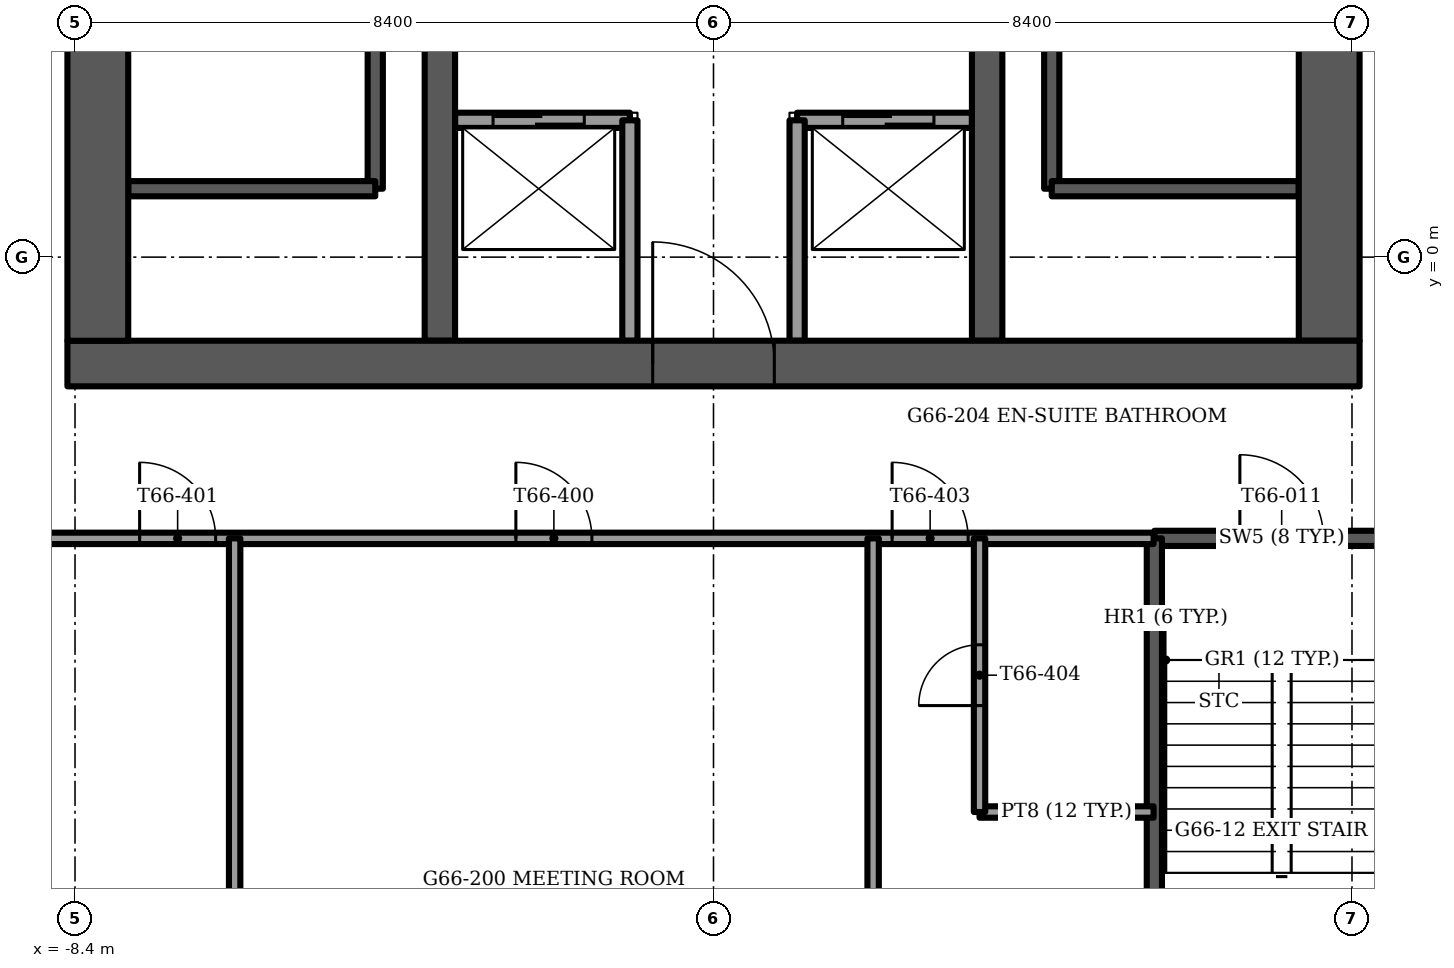
"""IFC4 building model, lengths in metres.
Left out: names, types, materials, properties, quantities, classifications, styles, units other than length and angle.
Written with IfcOpenShell. Run it as: python <this file> out.ifc"""

import sys

from ifc_helpers import new_model, si_unit, direction, frame, frame_2d, origin, place, context, subcontext, project, spatial, rectangle, extrude, element, fill, save


model = new_model("IFC4")
c1 = context("Model", 3, precision=1e-05, world=origin(), true_north=direction((0.0, 1.0)))
c2 = subcontext(c1, "Body", "Model", "MODEL_VIEW")
j1 = project(units=[si_unit("LENGTHUNIT", "METRE"), si_unit("PLANEANGLEUNIT", "RADIAN")], contexts=[c1])
p1 = place(None, origin())
s1 = spatial("IfcSite", under=j1, at=p1, CompositionType="ELEMENT")
p2 = place(p1, origin())
s2 = spatial("IfcBuilding", under=s1, at=p2, CompositionType="ELEMENT")
p3 = place(p2, frame((0.0, 0.0, 267.5)))
s3 = spatial("IfcBuildingStorey", under=s2, at=p3, CompositionType="ELEMENT", Elevation=267.5)
p4 = place(p3, frame((-8.5, -1.4, -0.3), z_axis=(0.0, 0.0, 1.0), x_axis=(1.0, 0.0, 0.0)))
e1 = element("IfcWall", 1, at=p4, inside=s3, PredefinedType="SHEAR", context=c2, shape_type="SweptSolid", body=[
    extrude(rectangle(XDim=17.0, YDim=0.6, at=frame_2d((8.5, 0.0))), origin(), (0.0, 0.0, 1.0), 3.75),
])
p5 = place(p4, frame((7.7, 0.0, 0.0)))
e2 = element("IfcOpeningElement", 2, at=p5, cuts=e1, PredefinedType="OPENING", context=c2, shape_type="SweptSolid", body=[
    extrude(rectangle(XDim=1.6, YDim=2.1, at=frame_2d((0.8, 1.05))), frame((0.0, 0.3, 0.0), z_axis=(0.0, -1.0, 0.0), x_axis=(1.0, 0.0, 0.0)), (0.0, 0.0, 1.0), 0.6),
])
p6 = place(p3, frame((-8.1, -1.1, -0.3), z_axis=(0.0, 0.0, 1.0), x_axis=(0.0, 1.0, 0.0)))
e3 = element("IfcWall", 3, at=p6, inside=s3, PredefinedType="SHEAR", context=c2, shape_type="SweptSolid", body=[
    extrude(rectangle(XDim=10.2, YDim=0.8, at=frame_2d((5.1, 0.0))), origin(), (0.0, 0.0, 1.0), 3.75),
])
p7 = place(p6, frame((8.35, 0.0, 0.0)))
e4 = element("IfcOpeningElement", 4, at=p7, cuts=e3, PredefinedType="OPENING", context=c2, shape_type="SweptSolid", body=[
    extrude(rectangle(XDim=1.1, YDim=2.1, at=frame_2d((0.55, 1.05))), frame((0.0, 0.4, 0.0), z_axis=(0.0, -1.0, 0.0), x_axis=(1.0, 0.0, 0.0)), (0.0, 0.0, 1.0), 0.8),
])
p8 = place(p3, frame((8.1, -1.1, -0.3), z_axis=(0.0, 0.0, 1.0), x_axis=(0.0, 1.0, 0.0)))
e5 = element("IfcWall", 5, at=p8, inside=s3, PredefinedType="SHEAR", context=c2, shape_type="SweptSolid", body=[
    extrude(rectangle(XDim=10.2, YDim=0.8, at=frame_2d((5.1, 0.0))), origin(), (0.0, 0.0, 1.0), 3.75),
])
p9 = place(p8, frame((8.35, 0.0, 0.0)))
e6 = element("IfcOpeningElement", 6, at=p9, cuts=e5, PredefinedType="OPENING", context=c2, shape_type="SweptSolid", body=[
    extrude(rectangle(XDim=1.1, YDim=2.1, at=frame_2d((0.55, 1.05))), frame((0.0, 0.4, 0.0), z_axis=(0.0, -1.0, 0.0), x_axis=(1.0, 0.0, 0.0)), (0.0, 0.0, 1.0), 0.8),
])
for number, where, z_axis, x_axis in (
    (7, (-3.6, -1.1, -0.3), (0.0, 0.0, 1.0), (0.0, 1.0, 0.0)),
    (8, (3.6, -1.1, -0.3), (0.0, 0.0, 1.0), (0.0, 1.0, 0.0)),
):
    element("IfcWall", number, at=place(p3, frame(where, z_axis=z_axis, x_axis=x_axis)), inside=s3, PredefinedType="SHEAR", context=c2, shape_type="SweptSolid", body=[
        extrude(rectangle(XDim=10.2, YDim=0.4, at=frame_2d((5.1, 0.0))), origin(), (0.0, 0.0, 1.0), 3.75),
    ])
p10 = place(p3, frame((-5.626, 15.792, 0.0), z_axis=(0.0, 0.0, 1.0), x_axis=(-0.499998195608, -0.866026445548, 0.0)))
e9 = element("IfcWall", 9, at=p10, inside=s3, PredefinedType="SOLIDWALL", context=c2, shape_type="SweptSolid", body=[
    extrude(rectangle(XDim=18.956, YDim=0.15, at=frame_2d((9.478, 0.0))), origin(), (0.0, 0.0, 1.0), 3.45),
])
p11 = place(p10, frame((3.577, 0.0, 0.0)))
e10 = element("IfcOpeningElement", 10, at=p11, cuts=e9, PredefinedType="OPENING", context=c2, shape_type="SweptSolid", body=[
    extrude(rectangle(XDim=1.4, YDim=2.4, at=frame_2d((0.7, 1.2))), frame((0.0, 0.075, 0.0), z_axis=(0.0, -1.0, 0.0), x_axis=(1.0, 0.0, 0.0)), (0.0, 0.0, 1.0), 0.15),
])
p12 = place(p10, frame((9.62, 0.0, 0.15)))
e11 = element("IfcOpeningElement", 11, at=p12, cuts=e9, PredefinedType="OPENING", context=c2, shape_type="SweptSolid", body=[
    extrude(rectangle(XDim=0.9, YDim=2.85, at=frame_2d((0.45, 1.425))), frame((0.0, 0.075, 0.0), z_axis=(0.0, -1.0, 0.0), x_axis=(1.0, 0.0, 0.0)), (0.0, 0.0, 1.0), 0.15),
])
p13 = place(p10, frame((7.52, 0.0, 0.15)))
e12 = element("IfcOpeningElement", 12, at=p13, cuts=e9, PredefinedType="OPENING", context=c2, shape_type="SweptSolid", body=[
    extrude(rectangle(XDim=1.4, YDim=2.85, at=frame_2d((0.7, 1.425))), frame((0.0, 0.075, 0.0), z_axis=(0.0, -1.0, 0.0), x_axis=(1.0, 0.0, 0.0)), (0.0, 0.0, 1.0), 0.15),
])
p14 = place(p10, frame((11.164, 0.0, 0.15)))
e13 = element("IfcOpeningElement", 13, at=p14, cuts=e9, PredefinedType="OPENING", context=c2, shape_type="SweptSolid", body=[
    extrude(rectangle(XDim=1.5, YDim=2.85, at=frame_2d((0.75, 1.425))), frame((0.0, 0.075, 0.0), z_axis=(0.0, -1.0, 0.0), x_axis=(1.0, 0.0, 0.0)), (0.0, 0.0, 1.0), 0.15),
])
p15 = place(p10, frame((13.364, 0.0, 0.15)))
e14 = element("IfcOpeningElement", 14, at=p15, cuts=e9, PredefinedType="OPENING", context=c2, shape_type="SweptSolid", body=[
    extrude(rectangle(XDim=1.4, YDim=2.85, at=frame_2d((0.7, 1.425))), frame((0.0, 0.075, 0.0), z_axis=(0.0, -1.0, 0.0), x_axis=(1.0, 0.0, 0.0)), (0.0, 0.0, 1.0), 0.15),
])
p16 = place(p10, frame((0.394, 0.0, 0.15)))
e15 = element("IfcOpeningElement", 15, at=p16, cuts=e9, PredefinedType="OPENING", context=c2, shape_type="SweptSolid", body=[
    extrude(rectangle(XDim=1.5, YDim=2.73, at=frame_2d((0.75, 1.365))), frame((0.0, 0.075, 0.0), z_axis=(0.0, -1.0, 0.0), x_axis=(1.0, 0.0, 0.0)), (0.0, 0.0, 1.0), 0.15),
])
p17 = place(p10, frame((15.574, 0.0, 0.15)))
e16 = element("IfcOpeningElement", 16, at=p17, cuts=e9, PredefinedType="OPENING", context=c2, shape_type="SweptSolid", body=[
    extrude(rectangle(XDim=1.5, YDim=2.73, at=frame_2d((0.75, 1.365))), frame((0.0, 0.075, 0.0), z_axis=(0.0, -1.0, 0.0), x_axis=(1.0, 0.0, 0.0)), (0.0, 0.0, 1.0), 0.15),
])
p18 = place(p3, frame((15.104, -0.624, 0.0), z_axis=(0.0, 0.0, 1.0), x_axis=(-0.499998195608, 0.866026445548, 0.0)))
e17 = element("IfcWall", 17, at=p18, inside=s3, PredefinedType="SOLIDWALL", context=c2, shape_type="SweptSolid", body=[
    extrude(rectangle(XDim=18.956, YDim=0.15, at=frame_2d((9.478, 0.0))), origin(), (0.0, 0.0, 1.0), 3.45),
])
p19 = place(p18, frame((4.192, 0.0, 0.15)))
e18 = element("IfcOpeningElement", 18, at=p19, cuts=e17, PredefinedType="OPENING", context=c2, shape_type="SweptSolid", body=[
    extrude(rectangle(XDim=1.5, YDim=2.85, at=frame_2d((0.75, 1.425))), frame((0.0, 0.075, 0.0), z_axis=(0.0, -1.0, 0.0), x_axis=(1.0, 0.0, 0.0)), (0.0, 0.0, 1.0), 0.15),
])
p20 = place(p18, frame((6.392, 0.0, 0.15)))
e19 = element("IfcOpeningElement", 19, at=p20, cuts=e17, PredefinedType="OPENING", context=c2, shape_type="SweptSolid", body=[
    extrude(rectangle(XDim=1.4, YDim=2.85, at=frame_2d((0.7, 1.425))), frame((0.0, 0.075, 0.0), z_axis=(0.0, -1.0, 0.0), x_axis=(1.0, 0.0, 0.0)), (0.0, 0.0, 1.0), 0.15),
])
p21 = place(p18, frame((8.392, 0.0, 0.15)))
e20 = element("IfcOpeningElement", 20, at=p21, cuts=e17, PredefinedType="OPENING", context=c2, shape_type="SweptSolid", body=[
    extrude(rectangle(XDim=0.9, YDim=2.85, at=frame_2d((0.45, 1.425))), frame((0.0, 0.075, 0.0), z_axis=(0.0, -1.0, 0.0), x_axis=(1.0, 0.0, 0.0)), (0.0, 0.0, 1.0), 0.15),
])
p22 = place(p18, frame((10.592, 0.0, 0.15)))
e21 = element("IfcOpeningElement", 21, at=p22, cuts=e17, PredefinedType="OPENING", context=c2, shape_type="SweptSolid", body=[
    extrude(rectangle(XDim=1.4, YDim=2.85, at=frame_2d((0.7, 1.425))), frame((0.0, 0.075, 0.0), z_axis=(0.0, -1.0, 0.0), x_axis=(1.0, 0.0, 0.0)), (0.0, 0.0, 1.0), 0.15),
])
p23 = place(p18, frame((14.168, 0.0, 0.0)))
e22 = element("IfcOpeningElement", 22, at=p23, cuts=e17, PredefinedType="OPENING", context=c2, shape_type="SweptSolid", body=[
    extrude(rectangle(XDim=1.4, YDim=2.4, at=frame_2d((0.7, 1.2))), frame((0.0, 0.075, 0.0), z_axis=(0.0, -1.0, 0.0), x_axis=(1.0, 0.0, 0.0)), (0.0, 0.0, 1.0), 0.15),
])
p24 = place(p18, frame((0.998, 0.0, 0.15)))
e23 = element("IfcOpeningElement", 23, at=p24, cuts=e17, PredefinedType="OPENING", context=c2, shape_type="SweptSolid", body=[
    extrude(rectangle(XDim=1.5, YDim=2.73, at=frame_2d((0.75, 1.365))), frame((0.0, 0.075, 0.0), z_axis=(0.0, -1.0, 0.0), x_axis=(1.0, 0.0, 0.0)), (0.0, 0.0, 1.0), 0.15),
])
p25 = place(p18, frame((17.062, 0.0, 0.15)))
e24 = element("IfcOpeningElement", 24, at=p25, cuts=e17, PredefinedType="OPENING", context=c2, shape_type="SweptSolid", body=[
    extrude(rectangle(XDim=1.5, YDim=2.73, at=frame_2d((0.75, 1.365))), frame((0.0, 0.075, 0.0), z_axis=(0.0, -1.0, 0.0), x_axis=(1.0, 0.0, 0.0)), (0.0, 0.0, 1.0), 0.15),
])
p26 = place(p3, frame((-3.4, 1.8, 0.0), z_axis=(0.0, 0.0, 1.0), x_axis=(1.0, 0.0, 0.0)))
e25 = element("IfcWall", 25, at=p26, inside=s3, PredefinedType="PARTITIONING", context=c2, shape_type="SweptSolid", body=[
    extrude(rectangle(XDim=2.3, YDim=0.2, at=frame_2d((1.15, 0.0))), origin(), (0.0, 0.0, 1.0), 3.45),
])
p27 = place(p26, frame((0.5, 0.0, 0.0)))
e26 = element("IfcOpeningElement", 26, at=p27, cuts=e25, PredefinedType="OPENING", context=c2, shape_type="SweptSolid", body=[
    extrude(rectangle(XDim=1.2, YDim=2.1, at=frame_2d((0.6, 1.05))), frame((0.0, 0.1, 0.0), z_axis=(0.0, -1.0, 0.0), x_axis=(1.0, 0.0, 0.0)), (0.0, 0.0, 1.0), 0.2),
])
p28 = place(p3, frame((1.1, 1.8, 0.0), z_axis=(0.0, 0.0, 1.0), x_axis=(1.0, 0.0, 0.0)))
e27 = element("IfcWall", 27, at=p28, inside=s3, PredefinedType="PARTITIONING", context=c2, shape_type="SweptSolid", body=[
    extrude(rectangle(XDim=2.3, YDim=0.2, at=frame_2d((1.15, 0.0))), origin(), (0.0, 0.0, 1.0), 3.45),
])
p29 = place(p28, frame((0.6, 0.0, 0.0)))
e28 = element("IfcOpeningElement", 28, at=p29, cuts=e27, PredefinedType="OPENING", context=c2, shape_type="SweptSolid", body=[
    extrude(rectangle(XDim=1.2, YDim=2.1, at=frame_2d((0.6, 1.05))), frame((0.0, 0.1, 0.0), z_axis=(0.0, -1.0, 0.0), x_axis=(1.0, 0.0, 0.0)), (0.0, 0.0, 1.0), 0.2),
])
for number, where, z_axis, x_axis in (
    (29, (-1.1, -1.1, 0.0), (0.0, 0.0, 1.0), (0.0, 1.0, 0.0)),
    (30, (1.1, -1.1, 0.0), (0.0, 0.0, 1.0), (0.0, 1.0, 0.0)),
):
    element("IfcWall", number, at=place(p3, frame(where, z_axis=z_axis, x_axis=x_axis)), inside=s3, PredefinedType="PARTITIONING", context=c2, shape_type="SweptSolid", body=[
        extrude(rectangle(XDim=2.9, YDim=0.2, at=frame_2d((1.45, 0.0))), origin(), (0.0, 0.0, 1.0), 3.45),
    ])
p30 = place(p3, frame((-4.45, 0.9, -0.3), z_axis=(0.0, 0.0, 1.0), x_axis=(0.0, 1.0, 0.0)))
e31 = element("IfcWall", 31, at=p30, inside=s3, PredefinedType="SOLIDWALL", context=c2, shape_type="SweptSolid", body=[
    extrude(rectangle(XDim=8.2, YDim=0.2, at=frame_2d((4.1, 0.0))), origin(), (0.0, 0.0, 1.0), 3.75),
])
p31 = place(p3, frame((-7.7, 0.9, -0.3), z_axis=(0.0, 0.0, 1.0), x_axis=(1.0, 0.0, 0.0)))
e32 = element("IfcWall", 32, at=p31, inside=s3, PredefinedType="SOLIDWALL", context=c2, shape_type="SweptSolid", body=[
    extrude(rectangle(XDim=3.25, YDim=0.2, at=frame_2d((1.625, 0.0))), origin(), (0.0, 0.0, 1.0), 3.75),
])
p32 = place(p3, frame((4.45, 0.9, -0.3), z_axis=(0.0, 0.0, 1.0), x_axis=(0.0, 1.0, 0.0)))
e33 = element("IfcWall", 33, at=p32, inside=s3, PredefinedType="SOLIDWALL", context=c2, shape_type="SweptSolid", body=[
    extrude(rectangle(XDim=8.2, YDim=0.2, at=frame_2d((4.1, 0.0))), origin(), (0.0, 0.0, 1.0), 3.75),
])
p33 = place(p3, frame((4.45, 0.9, -0.3), z_axis=(0.0, 0.0, 1.0), x_axis=(1.0, 0.0, 0.0)))
e34 = element("IfcWall", 34, at=p33, inside=s3, PredefinedType="SOLIDWALL", context=c2, shape_type="SweptSolid", body=[
    extrude(rectangle(XDim=3.25, YDim=0.2, at=frame_2d((1.625, 0.0))), origin(), (0.0, 0.0, 1.0), 3.75),
])
p34 = place(p3, frame((5.8, -3.7, -0.3), z_axis=(0.0, 0.0, 1.0), x_axis=(1.0, 0.0, 0.0)))
e35 = element("IfcWall", 35, at=p34, inside=s3, PredefinedType="SOLIDWALL", context=c2, shape_type="SweptSolid", body=[
    extrude(rectangle(XDim=3.35, YDim=0.2, at=frame_2d((1.675, 0.0))), origin(), (0.0, 0.0, 1.0), 3.75),
])
p35 = place(p34, frame((1.125, 0.0, 0.0)))
e36 = element("IfcOpeningElement", 36, at=p35, cuts=e35, PredefinedType="OPENING", context=c2, shape_type="SweptSolid", body=[
    extrude(rectangle(XDim=1.1, YDim=2.1, at=frame_2d((0.55, 1.05))), frame((0.0, 0.1, 0.0), z_axis=(0.0, -1.0, 0.0), x_axis=(1.0, 0.0, 0.0)), (0.0, 0.0, 1.0), 0.2),
])
p36 = place(p3, frame((5.8, -3.7, -0.3), z_axis=(0.0, 0.0, 1.0), x_axis=(0.0, -1.0, 0.0)))
e37 = element("IfcWall", 37, at=p36, inside=s3, PredefinedType="SOLIDWALL", context=c2, shape_type="SweptSolid", body=[
    extrude(rectangle(XDim=7.7, YDim=0.2, at=frame_2d((3.85, 0.0))), origin(), (0.0, 0.0, 1.0), 3.75),
])
p37 = place(p3, frame((3.5, -7.3, 0.0), z_axis=(0.0, 0.0, 1.0), x_axis=(1.0, 0.0, 0.0)))
e38 = element("IfcWall", 38, at=p37, inside=s3, PredefinedType="PARTITIONING", context=c2, shape_type="SweptSolid", body=[
    extrude(rectangle(XDim=2.29, YDim=0.15, at=frame_2d((1.145, 0.0))), origin(), (0.0, 0.0, 1.0), 3.45),
])
p38 = place(p3, frame((-13.995, -3.7, 0.0), z_axis=(0.0, 0.0, 1.0), x_axis=(1.0, 0.0, 0.0)))
e39 = element("IfcWall", 39, at=p38, inside=s3, PredefinedType="PARTITIONING", context=c2, shape_type="SweptSolid", body=[
    extrude(rectangle(XDim=19.785, YDim=0.15, at=frame_2d((9.893, 0.0))), origin(), (0.0, 0.0, 1.0), 3.45),
])
p39 = place(p38, frame((11.395, 0.0, 0.0)))
e40 = element("IfcOpeningElement", 40, at=p39, cuts=e39, PredefinedType="OPENING", context=c2, shape_type="SweptSolid", body=[
    extrude(rectangle(XDim=1.0, YDim=2.1, at=frame_2d((0.5, 1.05))), frame((0.0, 0.075, 0.0), z_axis=(0.0, -1.0, 0.0), x_axis=(1.0, 0.0, 0.0)), (0.0, 0.0, 1.0), 0.15),
])
p40 = place(p38, frame((6.445, 0.0, 0.0)))
e41 = element("IfcOpeningElement", 41, at=p40, cuts=e39, PredefinedType="OPENING", context=c2, shape_type="SweptSolid", body=[
    extrude(rectangle(XDim=1.0, YDim=2.1, at=frame_2d((0.5, 1.05))), frame((0.0, 0.075, 0.0), z_axis=(0.0, -1.0, 0.0), x_axis=(1.0, 0.0, 0.0)), (0.0, 0.0, 1.0), 0.15),
])
p41 = place(p38, frame((16.345, 0.0, 0.0)))
e42 = element("IfcOpeningElement", 42, at=p41, cuts=e39, PredefinedType="OPENING", context=c2, shape_type="SweptSolid", body=[
    extrude(rectangle(XDim=1.0, YDim=2.1, at=frame_2d((0.5, 1.05))), frame((0.0, 0.075, 0.0), z_axis=(0.0, -1.0, 0.0), x_axis=(1.0, 0.0, 0.0)), (0.0, 0.0, 1.0), 0.15),
])
p42 = place(p3, frame((3.5, -7.3, 0.0), z_axis=(0.0, 0.0, 1.0), x_axis=(0.0, 1.0, 0.0)))
e43 = element("IfcWall", 43, at=p42, inside=s3, PredefinedType="PARTITIONING", context=c2, shape_type="SweptSolid", body=[
    extrude(rectangle(XDim=3.6, YDim=0.15, at=frame_2d((1.8, 0.0))), origin(), (0.0, 0.0, 1.0), 3.45),
])
p43 = place(p42, frame((1.4, 0.0, 0.0)))
e44 = element("IfcOpeningElement", 44, at=p43, cuts=e43, PredefinedType="OPENING", context=c2, shape_type="SweptSolid", body=[
    extrude(rectangle(XDim=0.8, YDim=2.1, at=frame_2d((0.4, 1.05))), frame((0.0, 0.075, 0.0), z_axis=(0.0, -1.0, 0.0), x_axis=(1.0, 0.0, 0.0)), (0.0, 0.0, 1.0), 0.15),
])
for number, where, z_axis, x_axis in (
    (45, (2.1, -12.814, 0.0), (0.0, 0.0, 1.0), (0.0, 1.0, 0.0)),
    (46, (-6.3, -12.814, 0.0), (0.0, 0.0, 1.0), (0.0, 1.0, 0.0)),
):
    element("IfcWall", number, at=place(p3, frame(where, z_axis=z_axis, x_axis=x_axis)), inside=s3, PredefinedType="PARTITIONING", context=c2, shape_type="SweptSolid", body=[
        extrude(rectangle(XDim=9.114, YDim=0.15, at=frame_2d((4.557, 0.0))), origin(), (0.0, 0.0, 1.0), 3.45),
    ])
p44 = place(p27, origin())
e47 = element("IfcDoor", 47, at=p44, inside=s3, OperationType="SLIDING_TO_LEFT", PredefinedType="DOOR", context=c2, shape_type="SweptSolid", body=[
    extrude(rectangle(XDim=1.2, YDim=2.1, at=frame_2d((0.6, 1.05))), frame((0.0, 0.025, 0.0), z_axis=(0.0, -1.0, 0.0), x_axis=(1.0, 0.0, 0.0)), (0.0, 0.0, 1.0), 0.05),
])
fill(e26, e47)
p45 = place(p29, origin())
e48 = element("IfcDoor", 48, at=p45, inside=s3, OperationType="SLIDING_TO_LEFT", PredefinedType="DOOR", context=c2, shape_type="SweptSolid", body=[
    extrude(rectangle(XDim=1.2, YDim=2.1, at=frame_2d((0.6, 1.05))), frame((0.0, 0.025, 0.0), z_axis=(0.0, -1.0, 0.0), x_axis=(1.0, 0.0, 0.0)), (0.0, 0.0, 1.0), 0.05),
])
fill(e28, e48)
p46 = place(p5, origin())
e49 = element("IfcDoor", 49, at=p46, inside=s3, OperationType="DOUBLE_DOOR_SINGLE_SWING", PredefinedType="DOOR", context=c2, shape_type="SweptSolid", body=[
    extrude(rectangle(XDim=1.6, YDim=2.1, at=frame_2d((0.8, 1.05))), frame((0.0, 0.025, 0.0), z_axis=(0.0, -1.0, 0.0), x_axis=(1.0, 0.0, 0.0)), (0.0, 0.0, 1.0), 0.05),
])
fill(e2, e49)
p47 = place(p35, origin())
e50 = element("IfcDoor", 50, at=p47, inside=s3, OperationType="SINGLE_SWING_LEFT", PredefinedType="DOOR", context=c2, shape_type="SweptSolid", body=[
    extrude(rectangle(XDim=1.1, YDim=2.1, at=frame_2d((0.55, 1.05))), frame((0.0, 0.025, 0.0), z_axis=(0.0, -1.0, 0.0), x_axis=(1.0, 0.0, 0.0)), (0.0, 0.0, 1.0), 0.05),
])
fill(e36, e50)
p48 = place(p39, origin())
e51 = element("IfcDoor", 51, at=p48, inside=s3, OperationType="SINGLE_SWING_LEFT", PredefinedType="DOOR", context=c2, shape_type="SweptSolid", body=[
    extrude(rectangle(XDim=1.0, YDim=2.1, at=frame_2d((0.5, 1.05))), frame((0.0, 0.025, 0.0), z_axis=(0.0, -1.0, 0.0), x_axis=(1.0, 0.0, 0.0)), (0.0, 0.0, 1.0), 0.05),
])
fill(e40, e51)
p49 = place(p40, origin())
e52 = element("IfcDoor", 52, at=p49, inside=s3, OperationType="SINGLE_SWING_RIGHT", PredefinedType="DOOR", context=c2, shape_type="SweptSolid", body=[
    extrude(rectangle(XDim=1.0, YDim=2.1, at=frame_2d((0.5, 1.05))), frame((0.0, 0.025, 0.0), z_axis=(0.0, -1.0, 0.0), x_axis=(1.0, 0.0, 0.0)), (0.0, 0.0, 1.0), 0.05),
])
fill(e41, e52)
p50 = place(p41, origin())
e53 = element("IfcDoor", 53, at=p50, inside=s3, OperationType="SINGLE_SWING_LEFT", PredefinedType="DOOR", context=c2, shape_type="SweptSolid", body=[
    extrude(rectangle(XDim=1.0, YDim=2.1, at=frame_2d((0.5, 1.05))), frame((0.0, 0.025, 0.0), z_axis=(0.0, -1.0, 0.0), x_axis=(1.0, 0.0, 0.0)), (0.0, 0.0, 1.0), 0.05),
])
fill(e42, e53)
p51 = place(p43, origin())
e54 = element("IfcDoor", 54, at=p51, inside=s3, OperationType="SINGLE_SWING_RIGHT", PredefinedType="DOOR", context=c2, shape_type="SweptSolid", body=[
    extrude(rectangle(XDim=0.8, YDim=2.1, at=frame_2d((0.4, 1.05))), frame((0.0, 0.025, 0.0), z_axis=(0.0, -1.0, 0.0), x_axis=(1.0, 0.0, 0.0)), (0.0, 0.0, 1.0), 0.05),
])
fill(e44, e54)
save(model, sys.argv[1])
